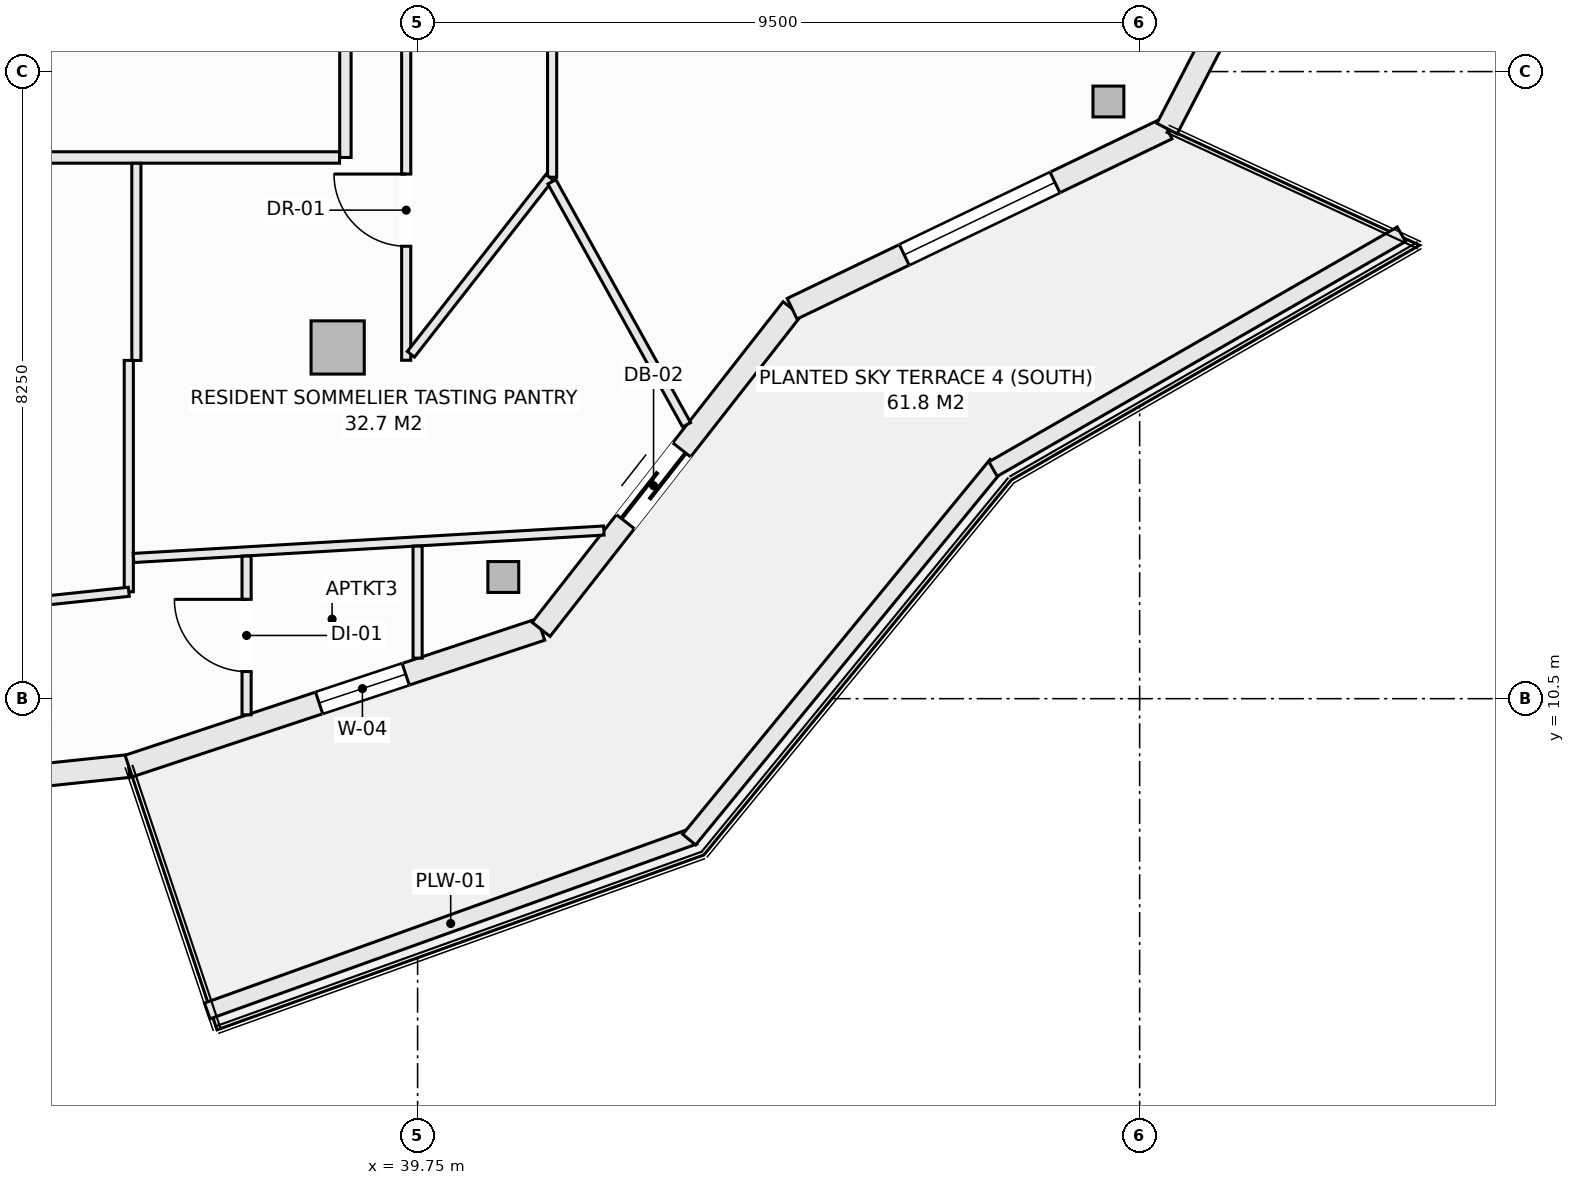
"""IFC4 building model, lengths in metres.
Left out: names, types, materials, properties, quantities, classifications, styles, units other than length and angle.
Written with IfcOpenShell. Run it as: python <this file> out.ifc"""

import sys

from ifc_helpers import new_model, si_unit, direction, frame, frame_2d, origin, origin_2d, place, context, subcontext, project, spatial, rectangle, hollow_rectangle, extrude, element, fill, save


model = new_model("IFC4")
c1 = context("Model", 3, precision=1e-05, world=origin(), true_north=direction((0.0, 1.0)))
c2 = subcontext(c1, "Body", "Model", "MODEL_VIEW")
j1 = project(units=[si_unit("LENGTHUNIT", "METRE"), si_unit("PLANEANGLEUNIT", "RADIAN")], contexts=[c1])
p1 = place(None, origin())
s1 = spatial("IfcSite", under=j1, at=p1, CompositionType="ELEMENT")
p2 = place(p1, origin())
s2 = spatial("IfcBuilding", under=s1, at=p2, CompositionType="ELEMENT")
p3 = place(p2, frame((0.0, 0.0, 245.9)))
s3 = spatial("IfcBuildingStorey", under=s2, at=p3, CompositionType="ELEMENT", Elevation=245.9)
for number, where, z_axis, x_axis in (
    (1, (40.878, 12.101, -0.27), (0.0, 0.0, 1.0), (1.0, 0.0, 0.0)),
    (2, (48.839, 18.356, -0.27), (0.0, 0.0, 1.0), (1.0, 0.0, 0.0)),
):
    element("IfcColumn", number, at=place(p3, frame(where, z_axis=z_axis, x_axis=x_axis)), inside=s3, PredefinedType="COLUMN", context=c2, shape_type="SweptSolid", body=[
        extrude(hollow_rectangle(XDim=0.406, YDim=0.406, WallThickness=0.016, at=origin_2d()), origin(), (0.0, 0.0, 1.0), 3.3),
    ])
p4 = place(p3, frame((38.698, 15.121, -0.27), z_axis=(0.0, 0.0, 1.0), x_axis=(1.0, 0.0, 0.0)))
e3 = element("IfcColumn", 3, at=p4, inside=s3, PredefinedType="COLUMN", context=c2, shape_type="SweptSolid", body=[
    extrude(rectangle(XDim=0.7, YDim=0.7, at=origin_2d()), origin(), (0.0, 0.0, 1.0), 3.3),
])
p5 = place(p3, frame((30.125, 9.0, 0.0), z_axis=(0.0, 0.0, 1.0), x_axis=(0.994500425783, 0.10473253132, 0.0)))
e4 = element("IfcWall", 4, at=p5, inside=s3, PredefinedType="SOLIDWALL", context=c2, shape_type="SweptSolid", body=[
    extrude(rectangle(XDim=5.856, YDim=0.3, at=frame_2d((2.928, 0.0))), origin(), (0.0, 0.0, 1.0), 2.605),
])
p6 = place(p5, frame((1.828, 0.0, 0.72)))
e5 = element("IfcOpeningElement", 5, at=p6, cuts=e4, PredefinedType="OPENING", context=c2, shape_type="SweptSolid", body=[
    extrude(rectangle(XDim=2.2, YDim=1.65, at=frame_2d((1.1, 0.825))), frame((0.0, 0.16, 0.0), z_axis=(0.0, -1.0, 0.0), x_axis=(1.0, 0.0, 0.0)), (0.0, 0.0, 1.0), 0.32),
])
p7 = place(p3, frame((35.948, 9.613, 0.0), z_axis=(0.0, 0.0, 1.0), x_axis=(0.949232769585, 0.314574552605, 0.0)))
e6 = element("IfcWall", 6, at=p7, inside=s3, PredefinedType="SOLIDWALL", context=c2, shape_type="SweptSolid", body=[
    extrude(rectangle(XDim=5.717, YDim=0.3, at=frame_2d((2.858, 0.0))), origin(), (0.0, 0.0, 1.0), 2.605),
])
p8 = place(p7, frame((2.64, 0.0, 0.72)))
e7 = element("IfcOpeningElement", 7, at=p8, cuts=e6, PredefinedType="OPENING", context=c2, shape_type="SweptSolid", body=[
    extrude(rectangle(XDim=1.2, YDim=1.65, at=frame_2d((0.6, 0.825))), frame((0.0, 0.16, 0.0), z_axis=(0.0, -1.0, 0.0), x_axis=(1.0, 0.0, 0.0)), (0.0, 0.0, 1.0), 0.32),
])
p9 = place(p3, frame((41.375, 11.412, 0.0), z_axis=(0.0, 0.0, 1.0), x_axis=(0.61644588519, 0.787397276241, 0.0)))
e8 = element("IfcWall", 8, at=p9, inside=s3, PredefinedType="SOLIDWALL", context=c2, shape_type="SweptSolid", body=[
    extrude(rectangle(XDim=5.357, YDim=0.3, at=frame_2d((2.678, 0.0))), origin(), (0.0, 0.0, 1.0), 2.605),
])
p10 = place(p9, frame((1.8, 0.0, 0.0)))
e9 = element("IfcOpeningElement", 9, at=p10, cuts=e8, PredefinedType="OPENING", context=c2, shape_type="SweptSolid", body=[
    extrude(rectangle(XDim=1.2, YDim=2.2, at=frame_2d((0.6, 1.1))), frame((0.0, 0.16, 0.0), z_axis=(0.0, -1.0, 0.0), x_axis=(1.0, 0.0, 0.0)), (0.0, 0.0, 1.0), 0.32),
])
p11 = place(p3, frame((44.677, 15.63, 0.0), z_axis=(0.0, 0.0, 1.0), x_axis=(0.901355238351, 0.433080517106, 0.0)))
e10 = element("IfcWall", 10, at=p11, inside=s3, PredefinedType="SOLIDWALL", context=c2, shape_type="SweptSolid", body=[
    extrude(rectangle(XDim=5.473, YDim=0.3, at=frame_2d((2.737, 0.0))), origin(), (0.0, 0.0, 1.0), 2.605),
])
p12 = place(p11, frame((1.637, 0.0, 0.72)))
e11 = element("IfcOpeningElement", 11, at=p12, cuts=e10, PredefinedType="OPENING", context=c2, shape_type="SweptSolid", body=[
    extrude(rectangle(XDim=2.2, YDim=1.65, at=frame_2d((1.1, 0.825))), frame((0.0, 0.16, 0.0), z_axis=(0.0, -1.0, 0.0), x_axis=(1.0, 0.0, 0.0)), (0.0, 0.0, 1.0), 0.32),
])
p13 = place(p3, frame((49.611, 18.0, 0.0), z_axis=(0.0, 0.0, 1.0), x_axis=(0.459793771602, 0.888025724625, 0.0)))
e12 = element("IfcWall", 12, at=p13, inside=s3, PredefinedType="SOLIDWALL", context=c2, shape_type="SweptSolid", body=[
    extrude(rectangle(XDim=4.889, YDim=0.3, at=frame_2d((2.444, 0.0))), origin(), (0.0, 0.0, 1.0), 2.605),
])
p14 = place(p13, frame((1.344, 0.0, 0.72)))
e13 = element("IfcOpeningElement", 13, at=p14, cuts=e12, PredefinedType="OPENING", context=c2, shape_type="SweptSolid", body=[
    extrude(rectangle(XDim=2.2, YDim=1.65, at=frame_2d((1.1, 0.825))), frame((0.0, 0.16, 0.0), z_axis=(0.0, -1.0, 0.0), x_axis=(1.0, 0.0, 0.0)), (0.0, 0.0, 1.0), 0.32),
])
p15 = place(p3, frame((36.982, 6.392, 0.0), z_axis=(0.0, 0.0, 1.0), x_axis=(0.941139090914, 0.338019543152, 0.0)))
e14 = element("IfcWall", 14, at=p15, inside=s3, PredefinedType="PARAPET", context=c2, shape_type="SweptSolid", body=[
    extrude(rectangle(XDim=6.807, YDim=0.22, at=frame_2d((3.403, 0.0))), origin(), (0.0, 0.0, 1.0), 0.52),
])
p16 = place(p3, frame((43.323, 8.646, 0.0), z_axis=(0.0, 0.0, 1.0), x_axis=(0.63407318032, 0.77327304492, 0.0)))
e15 = element("IfcWall", 15, at=p16, inside=s3, PredefinedType="PARAPET", context=c2, shape_type="SweptSolid", body=[
    extrude(rectangle(XDim=6.379, YDim=0.22, at=frame_2d((3.189, 0.0))), origin(), (0.0, 0.0, 1.0), 0.52),
])
p17 = place(p3, frame((47.321, 13.521, 0.0), z_axis=(0.0, 0.0, 1.0), x_axis=(0.866901621005, 0.49847926687, 0.0)))
e16 = element("IfcWall", 16, at=p17, inside=s3, PredefinedType="PARAPET", context=c2, shape_type="SweptSolid", body=[
    extrude(rectangle(XDim=6.197, YDim=0.22, at=frame_2d((3.098, 0.0))), origin(), (0.0, 0.0, 1.0), 0.52),
])
p18 = place(p3, frame((38.8, 17.62, 0.0), z_axis=(0.0, 0.0, 1.0), x_axis=(0.0, 1.0, 0.0)))
e17 = element("IfcWall", 17, at=p18, inside=s3, PredefinedType="PARTITIONING", context=c2, shape_type="SweptSolid", body=[
    extrude(rectangle(XDim=2.18, YDim=0.15, at=frame_2d((1.09, 0.0))), origin(), (0.0, 0.0, 1.0), 3.03),
])
p19 = place(p3, frame((30.077, 17.62, 0.0), z_axis=(0.0, 0.0, 1.0), x_axis=(1.0, 0.0, 0.0)))
e18 = element("IfcWall", 18, at=p19, inside=s3, PredefinedType="PARTITIONING", context=c2, shape_type="SweptSolid", body=[
    extrude(rectangle(XDim=8.646, YDim=0.15, at=frame_2d((4.323, 0.0))), origin(), (0.0, 0.0, 1.0), 3.03),
])
p20 = place(p19, frame((2.717, 0.0, 0.0)))
e19 = element("IfcOpeningElement", 19, at=p20, cuts=e18, PredefinedType="OPENING", context=c2, shape_type="SweptSolid", body=[
    extrude(rectangle(XDim=0.95, YDim=2.1, at=frame_2d((0.475, 1.05))), frame((0.0, 0.085, 0.0), z_axis=(0.0, -1.0, 0.0), x_axis=(1.0, 0.0, 0.0)), (0.0, 0.0, 1.0), 0.17),
])
p21 = place(p3, frame((39.6, 14.952, 0.0), z_axis=(0.0, 0.0, 1.0), x_axis=(0.0, 1.0, 0.0)))
e20 = element("IfcWall", 20, at=p21, inside=s3, PredefinedType="PARTITIONING", context=c2, shape_type="SweptSolid", body=[
    extrude(rectangle(XDim=8.068, YDim=0.12, at=frame_2d((4.034, 0.0))), origin(), (0.0, 0.0, 1.0), 2.478),
])
p22 = place(p21, frame((1.5, 0.0, 0.0)))
e21 = element("IfcOpeningElement", 21, at=p22, cuts=e20, PredefinedType="OPENING", context=c2, shape_type="SweptSolid", body=[
    extrude(rectangle(XDim=0.95, YDim=2.1, at=frame_2d((0.475, 1.05))), frame((0.0, 0.07, 0.0), z_axis=(0.0, -1.0, 0.0), x_axis=(1.0, 0.0, 0.0)), (0.0, 0.0, 1.0), 0.14),
])
p23 = place(p3, frame((41.52, 17.36, 0.0), z_axis=(0.0, 0.0, 1.0), x_axis=(0.0, 1.0, 0.0)))
e22 = element("IfcWall", 22, at=p23, inside=s3, PredefinedType="PARTITIONING", context=c2, shape_type="SweptSolid", body=[
    extrude(rectangle(XDim=3.447, YDim=0.12, at=frame_2d((1.723, 0.0))), origin(), (0.0, 0.0, 1.0), 3.03),
])
p24 = place(p3, frame((39.662, 15.031, 0.0), z_axis=(0.0, 0.0, 1.0), x_axis=(0.616497420092, 0.787356927334, 0.0)))
e23 = element("IfcWall", 23, at=p24, inside=s3, PredefinedType="PARTITIONING", context=c2, shape_type="SweptSolid", body=[
    extrude(rectangle(XDim=2.958, YDim=0.12, at=frame_2d((1.479, 0.0))), origin(), (0.0, 0.0, 1.0), 3.03),
])
p25 = place(p3, frame((36.05, 14.95, 0.0), z_axis=(0.0, 0.0, 1.0), x_axis=(0.0, 1.0, 0.0)))
e24 = element("IfcWall", 24, at=p25, inside=s3, PredefinedType="PARTITIONING", context=c2, shape_type="SweptSolid", body=[
    extrude(rectangle(XDim=2.593, YDim=0.12, at=frame_2d((1.296, 0.0))), origin(), (0.0, 0.0, 1.0), 3.03),
])
p26 = place(p3, frame((35.95, 11.906, 0.0), z_axis=(0.0, 0.0, 1.0), x_axis=(0.0, 1.0, 0.0)))
e25 = element("IfcWall", 25, at=p26, inside=s3, PredefinedType="PARTITIONING", context=c2, shape_type="SweptSolid", body=[
    extrude(rectangle(XDim=3.044, YDim=0.12, at=frame_2d((1.522, 0.0))), origin(), (0.0, 0.0, 1.0), 3.03),
])
p27 = place(p3, frame((34.468, 11.75, 0.0), z_axis=(0.0, 0.0, 1.0), x_axis=(0.994504555135, 0.104693313135, 0.0)))
e26 = element("IfcWall", 26, at=p27, inside=s3, PredefinedType="PARTITIONING", context=c2, shape_type="SweptSolid", body=[
    extrude(rectangle(XDim=1.49, YDim=0.12, at=frame_2d((0.745, 0.0))), origin(), (0.0, 0.0, 1.0), 3.03),
])
p28 = place(p3, frame((36.012, 12.351, 0.0), z_axis=(0.0, 0.0, 1.0), x_axis=(0.998301967663, 0.058251020246, 0.0)))
e27 = element("IfcWall", 27, at=p28, inside=s3, PredefinedType="PARTITIONING", context=c2, shape_type="SweptSolid", body=[
    extrude(rectangle(XDim=6.199, YDim=0.12, at=frame_2d((3.099, 0.0))), origin(), (0.0, 0.0, 1.0), 2.605),
])
p29 = place(p3, frame((37.5, 10.288, 0.0), z_axis=(0.0, 0.0, 1.0), x_axis=(0.0, 1.0, 0.0)))
e28 = element("IfcWall", 28, at=p29, inside=s3, PredefinedType="PARTITIONING", context=c2, shape_type="SweptSolid", body=[
    extrude(rectangle(XDim=2.088, YDim=0.12, at=frame_2d((1.044, 0.0))), origin(), (0.0, 0.0, 1.0), 3.03),
])
p30 = place(p29, frame((0.569, 0.0, 0.0)))
e29 = element("IfcOpeningElement", 29, at=p30, cuts=e28, PredefinedType="OPENING", context=c2, shape_type="SweptSolid", body=[
    extrude(rectangle(XDim=0.95, YDim=2.1, at=frame_2d((0.475, 1.05))), frame((0.0, 0.07, 0.0), z_axis=(0.0, -1.0, 0.0), x_axis=(1.0, 0.0, 0.0)), (0.0, 0.0, 1.0), 0.14),
])
p31 = place(p3, frame((39.75, 11.033, 0.0), z_axis=(0.0, 0.0, 1.0), x_axis=(0.0, 1.0, 0.0)))
e30 = element("IfcWall", 30, at=p31, inside=s3, PredefinedType="PARTITIONING", context=c2, shape_type="SweptSolid", body=[
    extrude(rectangle(XDim=1.474, YDim=0.12, at=frame_2d((0.737, 0.0))), origin(), (0.0, 0.0, 1.0), 3.03),
])
p32 = place(p3, frame((41.517, 17.3, 0.0), z_axis=(0.0, 0.0, 1.0), x_axis=(0.484911097078, -0.874563449917, 0.0)))
e31 = element("IfcWall", 31, at=p32, inside=s3, PredefinedType="PARTITIONING", context=c2, shape_type="SweptSolid", body=[
    extrude(rectangle(XDim=3.655, YDim=0.12, at=frame_2d((1.827, 0.0))), origin(), (0.0, 0.0, 1.0), 2.77),
])
p33 = place(p8, origin())
e32 = element("IfcWindow", 32, at=p33, inside=s3, PartitioningType="SINGLE_PANEL", PredefinedType="WINDOW", context=c2, shape_type="SweptSolid", body=[
    extrude(rectangle(XDim=1.2, YDim=1.65, at=frame_2d((0.6, 0.825))), frame((0.0, 0.03, 0.0), z_axis=(0.0, -1.0, 0.0), x_axis=(1.0, 0.0, 0.0)), (0.0, 0.0, 1.0), 0.06),
])
fill(e7, e32)
p34 = place(p10, frame((1.2, 0.0, 0.0), z_axis=(0.0, 0.0, 1.0), x_axis=(-1.0, 0.0, 0.0)))
e33 = element("IfcDoor", 33, at=p34, inside=s3, OperationType="SLIDING_TO_LEFT", PredefinedType="DOOR", context=c2, shape_type="SweptSolid", body=[
    extrude(rectangle(XDim=1.2, YDim=2.2, at=frame_2d((0.6, 1.1))), frame((0.0, 0.025, 0.0), z_axis=(0.0, -1.0, 0.0), x_axis=(1.0, 0.0, 0.0)), (0.0, 0.0, 1.0), 0.05),
])
fill(e9, e33)
p35 = place(p12, origin())
e34 = element("IfcWindow", 34, at=p35, inside=s3, PartitioningType="SINGLE_PANEL", PredefinedType="WINDOW", context=c2, shape_type="SweptSolid", body=[
    extrude(rectangle(XDim=2.2, YDim=1.65, at=frame_2d((1.1, 0.825))), frame((0.0, 0.03, 0.0), z_axis=(0.0, -1.0, 0.0), x_axis=(1.0, 0.0, 0.0)), (0.0, 0.0, 1.0), 0.06),
])
fill(e11, e34)
p36 = place(p22, origin())
e35 = element("IfcDoor", 35, at=p36, inside=s3, OperationType="SINGLE_SWING_RIGHT", PredefinedType="DOOR", context=c2, shape_type="SweptSolid", body=[
    extrude(rectangle(XDim=0.95, YDim=2.1, at=frame_2d((0.475, 1.05))), frame((0.0, 0.025, 0.0), z_axis=(0.0, -1.0, 0.0), x_axis=(1.0, 0.0, 0.0)), (0.0, 0.0, 1.0), 0.05),
])
fill(e21, e35)
p37 = place(p30, origin())
e36 = element("IfcDoor", 36, at=p37, inside=s3, OperationType="SINGLE_SWING_RIGHT", PredefinedType="DOOR", context=c2, shape_type="SweptSolid", body=[
    extrude(rectangle(XDim=0.95, YDim=2.1, at=frame_2d((0.475, 1.05))), frame((0.0, 0.025, 0.0), z_axis=(0.0, -1.0, 0.0), x_axis=(1.0, 0.0, 0.0)), (0.0, 0.0, 1.0), 0.05),
])
fill(e29, e36)
save(model, sys.argv[1])
